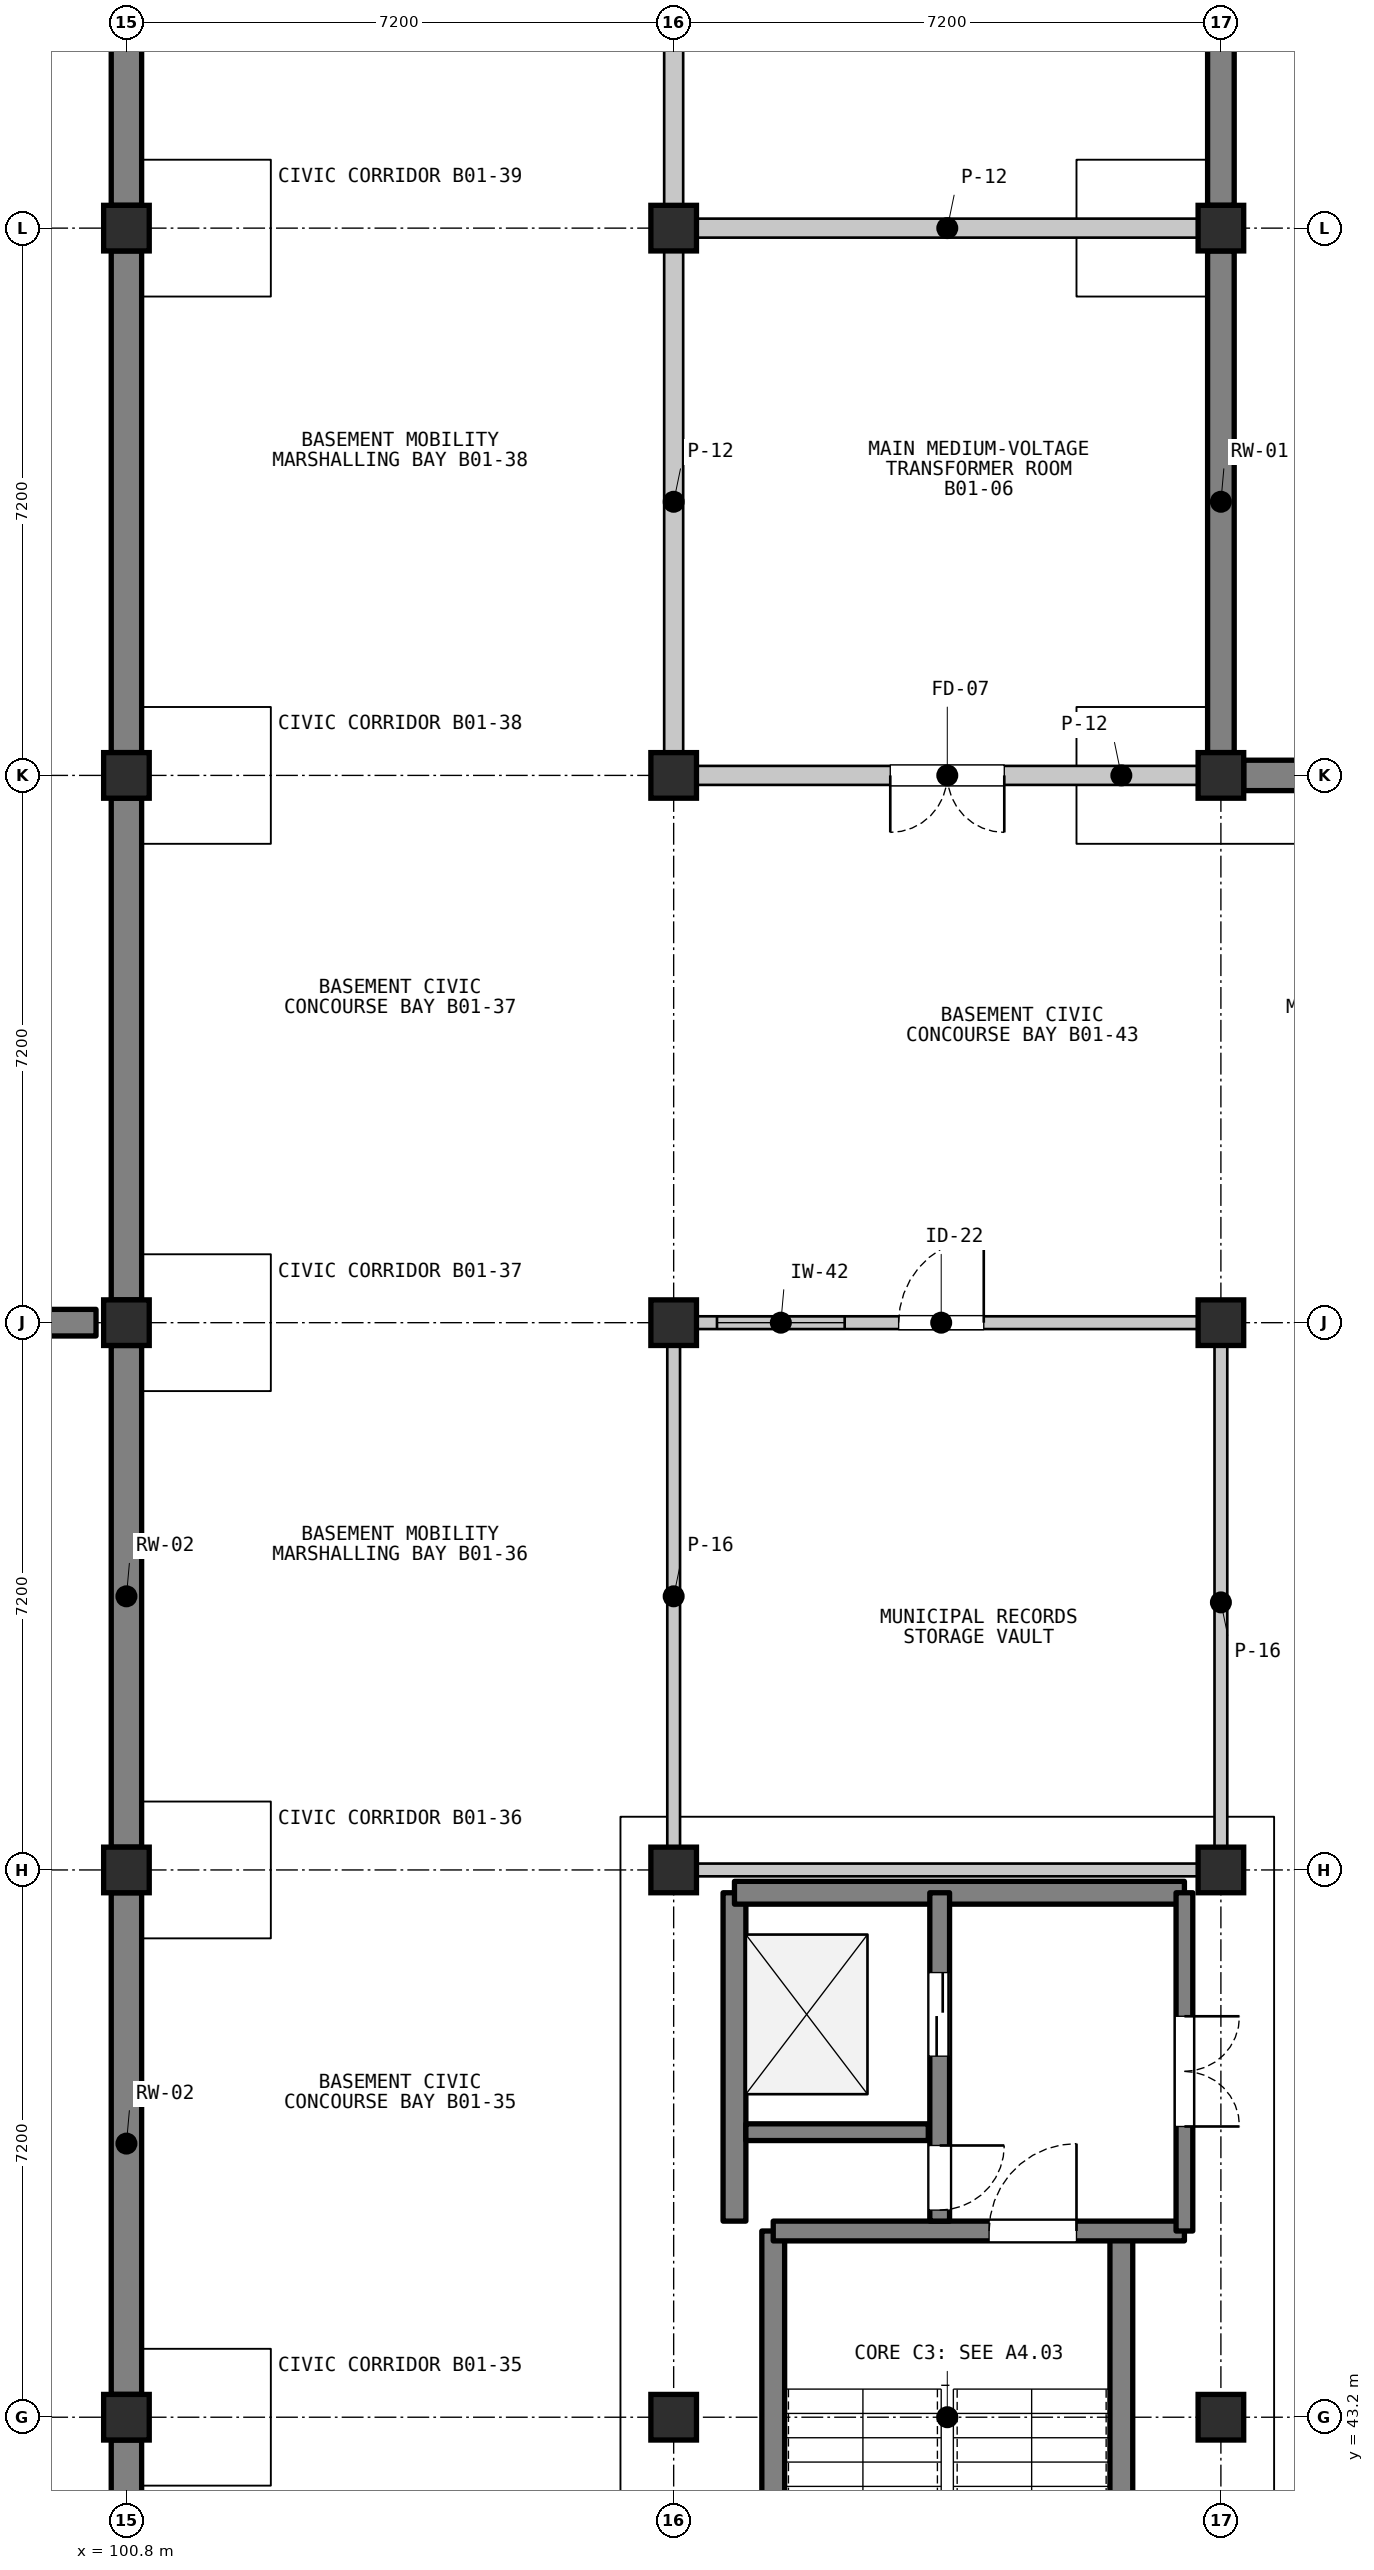
"""IFC4 building model, lengths in metres.
Left out: names, types, materials, properties, quantities, classifications, styles, units other than length and angle.
Written with IfcOpenShell. Run it as: python <this file> out.ifc"""

import sys

from ifc_helpers import new_model, si_unit, direction, frame, frame_2d, origin, origin_2d, place, context, subcontext, project, spatial, rectangle, extrude, element, fill, save


model = new_model("IFC4")
c1 = context("Model", 3, precision=1e-05, world=origin(), true_north=direction((0.0, 1.0)))
c2 = subcontext(c1, "Body", "Model", "MODEL_VIEW")
j1 = project(units=[si_unit("LENGTHUNIT", "METRE"), si_unit("PLANEANGLEUNIT", "RADIAN")], contexts=[c1])
p1 = place(None, origin())
s1 = spatial("IfcSite", under=j1, at=p1, CompositionType="ELEMENT")
p2 = place(p1, origin())
s2 = spatial("IfcBuilding", under=s1, at=p2, CompositionType="ELEMENT")
p3 = place(p2, frame((0.0, 0.0, -4.2)))
s3 = spatial("IfcBuildingStorey", under=s2, at=p3, CompositionType="ELEMENT", Elevation=-4.2)
p4 = place(p3, frame((100.8, 36.3, 0.0), z_axis=(0.0, 0.0, 1.0), x_axis=(0.0, 1.0, 0.0)))
e1 = element("IfcWall", 1, at=p4, inside=s3, PredefinedType="USERDEFINED", context=c2, shape_type="SweptSolid", body=[
    extrude(rectangle(XDim=6.6, YDim=0.4, at=frame_2d((3.3, 0.0))), origin(), (0.0, 0.0, 1.0), 3.98),
])
for number, where, z_axis, x_axis in (
    (2, (100.8, 43.5, 0.0), (0.0, 0.0, 1.0), (0.0, 1.0, 0.0)),
    (3, (100.8, 50.7, 0.0), (0.0, 0.0, 1.0), (0.0, 1.0, 0.0)),
    (4, (100.8, 57.9, 0.0), (0.0, 0.0, 1.0), (0.0, 1.0, 0.0)),
):
    element("IfcWall", number, at=place(p3, frame(where, z_axis=z_axis, x_axis=x_axis)), inside=s3, PredefinedType="USERDEFINED", context=c2, shape_type="SweptSolid", body=[
        extrude(rectangle(XDim=6.6, YDim=0.4, at=frame_2d((3.3, 0.0))), origin(), (0.0, 0.0, 1.0), 3.98),
    ])
for number, where, z_axis, x_axis in (
    (5, (100.8, 65.1, 0.0), (0.0, 0.0, 1.0), (0.0, 1.0, 0.0)),
    (6, (100.8, 72.3, 0.0), (0.0, 0.0, 1.0), (0.0, 1.0, 0.0)),
):
    element("IfcWall", number, at=place(p3, frame(where, z_axis=z_axis, x_axis=x_axis)), inside=s3, PredefinedType="USERDEFINED", context=c2, shape_type="SweptSolid", body=[
        extrude(rectangle(XDim=6.6, YDim=0.4, at=frame_2d((3.3, 0.0))), origin(), (0.0, 0.0, 1.0), 3.98),
    ])
for number, where, z_axis, x_axis in (
    (7, (115.2, 65.1, 0.0), (0.0, 0.0, 1.0), (0.0, 1.0, 0.0)),
    (8, (115.2, 72.3, 0.0), (0.0, 0.0, 1.0), (0.0, 1.0, 0.0)),
):
    element("IfcWall", number, at=place(p3, frame(where, z_axis=z_axis, x_axis=x_axis)), inside=s3, PredefinedType="USERDEFINED", context=c2, shape_type="SweptSolid", body=[
        extrude(rectangle(XDim=6.6, YDim=0.35, at=frame_2d((3.3, 0.0))), origin(), (0.0, 0.0, 1.0), 3.98),
    ])
p5 = place(p3, frame((115.5, 64.8, 0.0), z_axis=(0.0, 0.0, 1.0), x_axis=(1.0, 0.0, 0.0)))
e9 = element("IfcWall", 9, at=p5, inside=s3, PredefinedType="USERDEFINED", context=c2, shape_type="SweptSolid", body=[
    extrude(rectangle(XDim=6.6, YDim=0.4, at=frame_2d((3.3, 0.0))), origin(), (0.0, 0.0, 1.0), 3.98),
])
p6 = place(p3, frame((94.0, 57.6, 0.0), z_axis=(0.0, 0.0, 1.0), x_axis=(1.0, 0.0, 0.0)))
e10 = element("IfcWall", 10, at=p6, inside=s3, PredefinedType="USERDEFINED", context=c2, shape_type="SweptSolid", body=[
    extrude(rectangle(XDim=6.4, YDim=0.35, at=frame_2d((3.2, 0.0))), origin(), (0.0, 0.0, 1.0), 3.98),
])
for number, where, z_axis, x_axis in (
    (11, (100.8, 43.2, 0.0), (0.0, 0.0, 1.0), (1.0, 0.0, 0.0)),
    (12, (100.8, 50.4, 0.0), (0.0, 0.0, 1.0), (1.0, 0.0, 0.0)),
    (13, (100.8, 57.6, 0.0), (0.0, 0.0, 1.0), (1.0, 0.0, 0.0)),
    (14, (100.8, 64.8, 0.0), (0.0, 0.0, 1.0), (1.0, 0.0, 0.0)),
    (15, (100.8, 72.0, 0.0), (0.0, 0.0, 1.0), (1.0, 0.0, 0.0)),
    (16, (108.0, 43.2, 0.0), (0.0, 0.0, 1.0), (1.0, 0.0, 0.0)),
    (17, (108.0, 50.4, 0.0), (0.0, 0.0, 1.0), (1.0, 0.0, 0.0)),
    (18, (108.0, 57.6, 0.0), (0.0, 0.0, 1.0), (1.0, 0.0, 0.0)),
    (19, (108.0, 64.8, 0.0), (0.0, 0.0, 1.0), (1.0, 0.0, 0.0)),
    (20, (108.0, 72.0, 0.0), (0.0, 0.0, 1.0), (1.0, 0.0, 0.0)),
    (21, (115.2, 43.2, 0.0), (0.0, 0.0, 1.0), (1.0, 0.0, 0.0)),
    (22, (115.2, 50.4, 0.0), (0.0, 0.0, 1.0), (1.0, 0.0, 0.0)),
    (23, (115.2, 57.6, 0.0), (0.0, 0.0, 1.0), (1.0, 0.0, 0.0)),
    (24, (115.2, 64.8, 0.0), (0.0, 0.0, 1.0), (1.0, 0.0, 0.0)),
    (25, (115.2, 72.0, 0.0), (0.0, 0.0, 1.0), (1.0, 0.0, 0.0)),
):
    element("IfcColumn", number, at=place(p3, frame(where, z_axis=z_axis, x_axis=x_axis)), inside=s3, PredefinedType="COLUMN", context=c2, shape_type="SweptSolid", body=[
        extrude(rectangle(XDim=0.6, YDim=0.6, at=origin_2d()), origin(), (0.0, 0.0, 1.0), 4.2),
    ])
for number, where, z_axis, x_axis in (
    (26, (109.31, 36.35, 0.0), (0.0, 0.0, 1.0), (0.0, 1.0, 0.0)),
    (27, (113.89, 36.35, 0.0), (0.0, 0.0, 1.0), (0.0, 1.0, 0.0)),
):
    element("IfcWall", number, at=place(p3, frame(where, z_axis=z_axis, x_axis=x_axis)), inside=s3, PredefinedType="SHEAR", context=c2, shape_type="SweptSolid", body=[
        extrude(rectangle(XDim=9.3, YDim=0.3, at=frame_2d((4.65, 0.0))), origin(), (0.0, 0.0, 1.0), 3.98),
    ])
p7 = place(p3, frame((109.31, 45.65, 0.0), z_axis=(0.0, 0.0, 1.0), x_axis=(1.0, 0.0, 0.0)))
e28 = element("IfcWall", 28, at=p7, inside=s3, PredefinedType="SHEAR", context=c2, shape_type="SweptSolid", body=[
    extrude(rectangle(XDim=5.41, YDim=0.26, at=frame_2d((2.705, 0.0))), origin(), (0.0, 0.0, 1.0), 3.98),
])
p8 = place(p7, frame((2.84, 0.0, 0.0)))
e29 = element("IfcOpeningElement", 29, at=p8, cuts=e28, PredefinedType="OPENING", context=c2, shape_type="SweptSolid", body=[
    extrude(rectangle(XDim=1.15, YDim=2.15, at=frame_2d((0.575, 1.075))), frame((0.0, 0.14, 0.0), z_axis=(0.0, -1.0, 0.0), x_axis=(1.0, 0.0, 0.0)), (0.0, 0.0, 1.0), 0.28),
])
p9 = place(p3, frame((108.8, 45.78, 0.0), z_axis=(0.0, 0.0, 1.0), x_axis=(0.0, 1.0, 0.0)))
e30 = element("IfcWall", 30, at=p9, inside=s3, PredefinedType="SHEAR", context=c2, shape_type="SweptSolid", body=[
    extrude(rectangle(XDim=4.32, YDim=0.3, at=frame_2d((2.16, 0.0))), origin(), (0.0, 0.0, 1.0), 3.98),
])
p10 = place(p3, frame((108.8, 50.1, 0.0), z_axis=(0.0, 0.0, 1.0), x_axis=(1.0, 0.0, 0.0)))
e31 = element("IfcWall", 31, at=p10, inside=s3, PredefinedType="SHEAR", context=c2, shape_type="SweptSolid", body=[
    extrude(rectangle(XDim=5.92, YDim=0.3, at=frame_2d((2.96, 0.0))), origin(), (0.0, 0.0, 1.0), 3.98),
])
p11 = place(p3, frame((108.95, 46.95, 0.0), z_axis=(0.0, 0.0, 1.0), x_axis=(1.0, 0.0, 0.0)))
e32 = element("IfcWall", 32, at=p11, inside=s3, PredefinedType="SHEAR", context=c2, shape_type="SweptSolid", body=[
    extrude(rectangle(XDim=2.4, YDim=0.22, at=frame_2d((1.2, 0.0))), origin(), (0.0, 0.0, 1.0), 3.98),
])
p12 = place(p3, frame((111.5, 50.1, 0.0), z_axis=(0.0, 0.0, 1.0), x_axis=(0.0, -1.0, 0.0)))
e33 = element("IfcWall", 33, at=p12, inside=s3, PredefinedType="SHEAR", context=c2, shape_type="SweptSolid", body=[
    extrude(rectangle(XDim=4.32, YDim=0.26, at=frame_2d((2.16, 0.0))), origin(), (0.0, 0.0, 1.0), 3.98),
])
p13 = place(p12, frame((1.05, 0.0, 0.0)))
e34 = element("IfcOpeningElement", 34, at=p13, cuts=e33, PredefinedType="OPENING", context=c2, shape_type="SweptSolid", body=[
    extrude(rectangle(XDim=1.1, YDim=2.15, at=frame_2d((0.55, 1.075))), frame((0.0, 0.14, 0.0), z_axis=(0.0, -1.0, 0.0), x_axis=(1.0, 0.0, 0.0)), (0.0, 0.0, 1.0), 0.28),
])
p14 = place(p12, frame((3.325, 0.0, 0.0)))
e35 = element("IfcOpeningElement", 35, at=p14, cuts=e33, PredefinedType="OPENING", context=c2, shape_type="SweptSolid", body=[
    extrude(rectangle(XDim=0.85, YDim=2.05, at=frame_2d((0.425, 1.025))), frame((0.0, 0.14, 0.0), z_axis=(0.0, -1.0, 0.0), x_axis=(1.0, 0.0, 0.0)), (0.0, 0.0, 1.0), 0.28),
])
p15 = place(p3, frame((114.72, 50.1, 0.0), z_axis=(0.0, 0.0, 1.0), x_axis=(0.0, -1.0, 0.0)))
e36 = element("IfcWall", 36, at=p15, inside=s3, PredefinedType="SHEAR", context=c2, shape_type="SweptSolid", body=[
    extrude(rectangle(XDim=4.45, YDim=0.22, at=frame_2d((2.225, 0.0))), origin(), (0.0, 0.0, 1.0), 3.98),
])
p16 = place(p15, frame((1.625, 0.0, 0.0)))
e37 = element("IfcOpeningElement", 37, at=p16, cuts=e36, PredefinedType="OPENING", context=c2, shape_type="SweptSolid", body=[
    extrude(rectangle(XDim=1.45, YDim=2.2, at=frame_2d((0.725, 1.1))), frame((0.0, 0.12, 0.0), z_axis=(0.0, -1.0, 0.0), x_axis=(1.0, 0.0, 0.0)), (0.0, 0.0, 1.0), 0.24),
])
p17 = place(p3, frame((108.12, 57.6, 0.0), z_axis=(0.0, 0.0, 1.0), x_axis=(1.0, 0.0, 0.0)))
e38 = element("IfcWall", 38, at=p17, inside=s3, PredefinedType="PARTITIONING", context=c2, shape_type="SweptSolid", body=[
    extrude(rectangle(XDim=6.8, YDim=0.168, at=frame_2d((3.4, 0.0))), origin(), (0.0, 0.0, 1.0), 3.208),
])
p18 = place(p17, frame((2.84, 0.0, 0.0)))
e39 = element("IfcOpeningElement", 39, at=p18, cuts=e38, PredefinedType="OPENING", context=c2, shape_type="SweptSolid", body=[
    extrude(rectangle(XDim=1.12, YDim=2.15, at=frame_2d((0.56, 1.075))), frame((0.0, 0.094, 0.0), z_axis=(0.0, -1.0, 0.0), x_axis=(1.0, 0.0, 0.0)), (0.0, 0.0, 1.0), 0.188),
])
p19 = place(p17, frame((0.45, 0.0, 1.05)))
e40 = element("IfcOpeningElement", 40, at=p19, cuts=e38, PredefinedType="OPENING", context=c2, shape_type="SweptSolid", body=[
    extrude(rectangle(XDim=1.68, YDim=1.34, at=frame_2d((0.84, 0.67))), frame((0.0, 0.094, 0.0), z_axis=(0.0, -1.0, 0.0), x_axis=(1.0, 0.0, 0.0)), (0.0, 0.0, 1.0), 0.188),
])
for number, where, z_axis, x_axis in (
    (41, (115.08, 50.4, 0.0), (0.0, 0.0, 1.0), (-1.0, 0.0, 0.0)),
    (42, (108.0, 50.52, 0.0), (0.0, 0.0, 1.0), (0.0, 1.0, 0.0)),
):
    element("IfcWall", number, at=place(p3, frame(where, z_axis=z_axis, x_axis=x_axis)), inside=s3, PredefinedType="PARTITIONING", context=c2, shape_type="SweptSolid", body=[
        extrude(rectangle(XDim=6.96, YDim=0.168, at=frame_2d((3.48, 0.0))), origin(), (0.0, 0.0, 1.0), 3.208),
    ])
p20 = place(p3, frame((115.2, 57.32, 0.0), z_axis=(0.0, 0.0, 1.0), x_axis=(0.0, -1.0, 0.0)))
e43 = element("IfcWall", 43, at=p20, inside=s3, PredefinedType="PARTITIONING", context=c2, shape_type="SweptSolid", body=[
    extrude(rectangle(XDim=6.8, YDim=0.168, at=frame_2d((3.4, 0.0))), origin(), (0.0, 0.0, 1.0), 3.208),
])
p21 = place(p3, frame((115.08, 64.8, 0.0), z_axis=(0.0, 0.0, 1.0), x_axis=(-1.0, 0.0, 0.0)))
e44 = element("IfcWall", 44, at=p21, inside=s3, PredefinedType="PARTITIONING", context=c2, shape_type="SweptSolid", body=[
    extrude(rectangle(XDim=6.96, YDim=0.25, at=frame_2d((3.48, 0.0))), origin(), (0.0, 0.0, 1.0), 3.208),
])
p22 = place(p21, frame((2.73, 0.0, 0.0)))
e45 = element("IfcOpeningElement", 45, at=p22, cuts=e44, PredefinedType="OPENING", context=c2, shape_type="SweptSolid", body=[
    extrude(rectangle(XDim=1.5, YDim=2.25, at=frame_2d((0.75, 1.125))), frame((0.0, 0.135, 0.0), z_axis=(0.0, -1.0, 0.0), x_axis=(1.0, 0.0, 0.0)), (0.0, 0.0, 1.0), 0.27),
])
for number, where, z_axis, x_axis in (
    (46, (108.12, 72.0, 0.0), (0.0, 0.0, 1.0), (1.0, 0.0, 0.0)),
    (47, (108.0, 64.92, 0.0), (0.0, 0.0, 1.0), (0.0, 1.0, 0.0)),
    (48, (108.0, 72.12, 0.0), (0.0, 0.0, 1.0), (0.0, 1.0, 0.0)),
):
    element("IfcWall", number, at=place(p3, frame(where, z_axis=z_axis, x_axis=x_axis)), inside=s3, PredefinedType="PARTITIONING", context=c2, shape_type="SweptSolid", body=[
        extrude(rectangle(XDim=6.96, YDim=0.25, at=frame_2d((3.48, 0.0))), origin(), (0.0, 0.0, 1.0), 3.208),
    ])
p23 = place(p8, origin())
e49 = element("IfcDoor", 49, at=p23, inside=s3, OperationType="SINGLE_SWING_RIGHT", PredefinedType="DOOR", context=c2, shape_type="SweptSolid", body=[
    extrude(rectangle(XDim=1.15, YDim=2.15, at=frame_2d((0.575, 1.075))), frame((0.0, 0.025, 0.0), z_axis=(0.0, -1.0, 0.0), x_axis=(1.0, 0.0, 0.0)), (0.0, 0.0, 1.0), 0.05),
])
fill(e29, e49)
p24 = place(p13, origin())
e50 = element("IfcDoor", 50, at=p24, inside=s3, OperationType="DOUBLE_DOOR_SLIDING", PredefinedType="DOOR", context=c2, shape_type="SweptSolid", body=[
    extrude(rectangle(XDim=1.1, YDim=2.15, at=frame_2d((0.55, 1.075))), frame((0.0, 0.025, 0.0), z_axis=(0.0, -1.0, 0.0), x_axis=(1.0, 0.0, 0.0)), (0.0, 0.0, 1.0), 0.05),
])
fill(e34, e50)
p25 = place(p14, origin())
e51 = element("IfcDoor", 51, at=p25, inside=s3, OperationType="SINGLE_SWING_LEFT", PredefinedType="DOOR", context=c2, shape_type="SweptSolid", body=[
    extrude(rectangle(XDim=0.85, YDim=2.05, at=frame_2d((0.425, 1.025))), frame((0.0, 0.025, 0.0), z_axis=(0.0, -1.0, 0.0), x_axis=(1.0, 0.0, 0.0)), (0.0, 0.0, 1.0), 0.05),
])
fill(e35, e51)
p26 = place(p16, origin())
e52 = element("IfcDoor", 52, at=p26, inside=s3, OperationType="DOUBLE_DOOR_SINGLE_SWING", PredefinedType="DOOR", context=c2, shape_type="SweptSolid", body=[
    extrude(rectangle(XDim=1.45, YDim=2.2, at=frame_2d((0.725, 1.1))), frame((0.0, 0.025, 0.0), z_axis=(0.0, -1.0, 0.0), x_axis=(1.0, 0.0, 0.0)), (0.0, 0.0, 1.0), 0.05),
])
fill(e37, e52)
p27 = place(p18, origin())
e53 = element("IfcDoor", 53, at=p27, inside=s3, OperationType="SINGLE_SWING_RIGHT", PredefinedType="DOOR", context=c2, shape_type="SweptSolid", body=[
    extrude(rectangle(XDim=1.12, YDim=2.15, at=frame_2d((0.56, 1.075))), frame((0.0, 0.025, 0.0), z_axis=(0.0, -1.0, 0.0), x_axis=(1.0, 0.0, 0.0)), (0.0, 0.0, 1.0), 0.05),
])
fill(e39, e53)
p28 = place(p19, origin())
e54 = element("IfcWindow", 54, at=p28, inside=s3, PartitioningType="SINGLE_PANEL", PredefinedType="WINDOW", context=c2, shape_type="SweptSolid", body=[
    extrude(rectangle(XDim=1.68, YDim=1.34, at=frame_2d((0.84, 0.67))), frame((0.0, 0.03, 0.0), z_axis=(0.0, -1.0, 0.0), x_axis=(1.0, 0.0, 0.0)), (0.0, 0.0, 1.0), 0.06),
])
fill(e40, e54)
p29 = place(p22, origin())
e55 = element("IfcDoor", 55, at=p29, inside=s3, OperationType="DOUBLE_DOOR_SINGLE_SWING", PredefinedType="DOOR", context=c2, shape_type="SweptSolid", body=[
    extrude(rectangle(XDim=1.5, YDim=2.25, at=frame_2d((0.75, 1.125))), frame((0.0, 0.025, 0.0), z_axis=(0.0, -1.0, 0.0), x_axis=(1.0, 0.0, 0.0)), (0.0, 0.0, 1.0), 0.05),
])
fill(e45, e55)
save(model, sys.argv[1])
